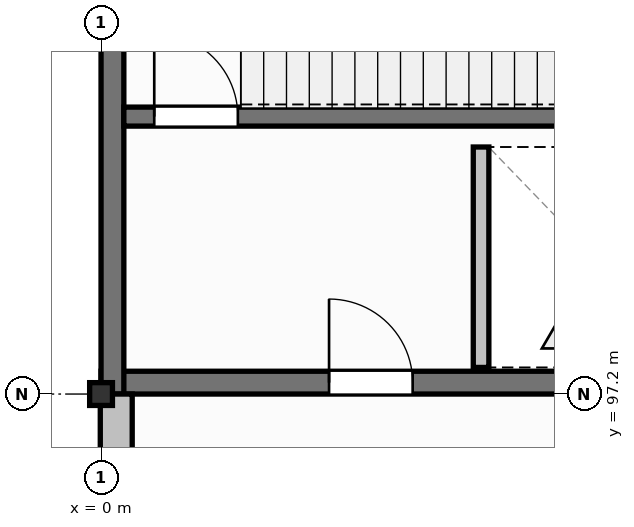
"""IFC4 building model, lengths in metres.
Left out: names, types, materials, properties, quantities, classifications, styles, units other than length and angle.
Written with IfcOpenShell. Run it as: python <this file> out.ifc"""

import sys

from ifc_helpers import new_model, si_unit, direction, frame, frame_2d, origin, origin_2d, place, context, subcontext, project, spatial, rectangle, i_section, extrude, element, fill, save


model = new_model("IFC4")
c1 = context("Model", 3, precision=1e-05, world=origin(), true_north=direction((0.0, 1.0)))
c2 = subcontext(c1, "Body", "Model", "MODEL_VIEW")
j1 = project(units=[si_unit("LENGTHUNIT", "METRE"), si_unit("PLANEANGLEUNIT", "RADIAN")], contexts=[c1])
p1 = place(None, origin())
s1 = spatial("IfcSite", under=j1, at=p1, CompositionType="ELEMENT")
p2 = place(p1, origin())
s2 = spatial("IfcBuilding", under=s1, at=p2, CompositionType="ELEMENT")
p3 = place(p2, frame((0.0, 0.0, 4.5)))
s3 = spatial("IfcBuildingStorey", under=s2, at=p3, CompositionType="ELEMENT", Elevation=4.5)
p4 = place(p3, frame((0.0, 97.35, 0.0), z_axis=(0.0, 0.0, 1.0), x_axis=(1.0, 0.0, 0.0)))
e1 = element("IfcWall", 1, at=p4, inside=s3, PredefinedType="SHEAR", context=c2, shape_type="SweptSolid", body=[
    extrude(rectangle(XDim=8.4, YDim=0.3, at=frame_2d((4.2, 0.0))), origin(), (0.0, 0.0, 1.0), 4.5),
])
p5 = place(p4, frame((3.0, 0.0, 0.0)))
e2 = element("IfcOpeningElement", 2, at=p5, cuts=e1, PredefinedType="OPENING", context=c2, shape_type="SweptSolid", body=[
    extrude(rectangle(XDim=1.1, YDim=2.15, at=frame_2d((0.55, 1.075))), frame((0.0, 0.16, 0.0), z_axis=(0.0, -1.0, 0.0), x_axis=(1.0, 0.0, 0.0)), (0.0, 0.0, 1.0), 0.32),
])
p6 = place(p3, frame((0.15, 97.2, 0.0), z_axis=(0.0, 0.0, 1.0), x_axis=(0.0, 1.0, 0.0)))
e3 = element("IfcWall", 3, at=p6, inside=s3, PredefinedType="SHEAR", context=c2, shape_type="SweptSolid", body=[
    extrude(rectangle(XDim=7.2, YDim=0.3, at=frame_2d((3.6, 0.0))), origin(), (0.0, 0.0, 1.0), 4.5),
])
p7 = place(p3, frame((0.3, 100.85, 0.0), z_axis=(0.0, 0.0, 1.0), x_axis=(1.0, 0.0, 0.0)))
e4 = element("IfcWall", 4, at=p7, inside=s3, PredefinedType="SHEAR", context=c2, shape_type="SweptSolid", body=[
    extrude(rectangle(XDim=7.8, YDim=0.25, at=frame_2d((3.9, 0.0))), origin(), (0.0, 0.0, 1.0), 4.5),
])
p8 = place(p7, frame((0.4, 0.0, 0.0)))
e5 = element("IfcOpeningElement", 5, at=p8, cuts=e4, PredefinedType="OPENING", context=c2, shape_type="SweptSolid", body=[
    extrude(rectangle(XDim=1.1, YDim=2.15, at=frame_2d((0.55, 1.075))), frame((0.0, 0.135, 0.0), z_axis=(0.0, -1.0, 0.0), x_axis=(1.0, 0.0, 0.0)), (0.0, 0.0, 1.0), 0.27),
])
p9 = place(p3, frame((0.0, 97.2, 0.0), z_axis=(0.0, 0.0, 1.0), x_axis=(1.0, 0.0, 0.0)))
e6 = element("IfcColumn", 6, at=p9, inside=s3, PredefinedType="COLUMN", context=c2, shape_type="SweptSolid", body=[
    extrude(i_section(OverallWidth=0.3, OverallDepth=0.3, WebThickness=0.011, FlangeThickness=0.019, FilletRadius=0.027, at=origin_2d()), origin(), (0.0, 0.0, 1.0), 4.5),
])
p10 = place(p3, frame((0.2, 90.0, 0.0), z_axis=(0.0, 0.0, 1.0), x_axis=(0.0, 1.0, 0.0)))
e7 = element("IfcWall", 7, at=p10, inside=s3, PredefinedType="SOLIDWALL", context=c2, shape_type="SweptSolid", body=[
    extrude(rectangle(XDim=7.2, YDim=0.42, at=frame_2d((3.6, 0.0))), origin(), (0.0, 0.0, 1.0), 3.838),
])
p11 = place(p10, frame((1.2, 0.0, 0.85)))
e8 = element("IfcOpeningElement", 8, at=p11, cuts=e7, PredefinedType="OPENING", context=c2, shape_type="SweptSolid", body=[
    extrude(rectangle(XDim=2.4, YDim=2.05, at=frame_2d((1.2, 1.025))), frame((0.0, 0.22, 0.0), z_axis=(0.0, -1.0, 0.0), x_axis=(1.0, 0.0, 0.0)), (0.0, 0.0, 1.0), 0.44),
])
p12 = place(p10, frame((4.175, 0.0, 0.85)))
e9 = element("IfcOpeningElement", 9, at=p12, cuts=e7, PredefinedType="OPENING", context=c2, shape_type="SweptSolid", body=[
    extrude(rectangle(XDim=1.25, YDim=1.5, at=frame_2d((0.625, 0.75))), frame((0.0, 0.22, 0.0), z_axis=(0.0, -1.0, 0.0), x_axis=(1.0, 0.0, 0.0)), (0.0, 0.0, 1.0), 0.44),
])
p13 = place(p3, frame((5.0, 97.55, 0.0), z_axis=(0.0, 0.0, 1.0), x_axis=(0.0, 1.0, 0.0)))
e10 = element("IfcWall", 10, at=p13, inside=s3, PredefinedType="PARTITIONING", context=c2, shape_type="SweptSolid", body=[
    extrude(rectangle(XDim=2.9, YDim=0.205, at=frame_2d((1.45, 0.0))), origin(), (0.0, 0.0, 1.0), 4.23),
])
p14 = place(p8, origin())
e11 = element("IfcDoor", 11, at=p14, inside=s3, OperationType="SINGLE_SWING_LEFT", PredefinedType="DOOR", context=c2, shape_type="SweptSolid", body=[
    extrude(rectangle(XDim=1.1, YDim=2.15, at=frame_2d((0.55, 1.075))), frame((0.0, 0.025, 0.0), z_axis=(0.0, -1.0, 0.0), x_axis=(1.0, 0.0, 0.0)), (0.0, 0.0, 1.0), 0.05),
])
fill(e5, e11)
p15 = place(p5, origin())
e12 = element("IfcDoor", 12, at=p15, inside=s3, OperationType="SINGLE_SWING_LEFT", PredefinedType="DOOR", context=c2, shape_type="SweptSolid", body=[
    extrude(rectangle(XDim=1.1, YDim=2.15, at=frame_2d((0.55, 1.075))), frame((0.0, 0.025, 0.0), z_axis=(0.0, -1.0, 0.0), x_axis=(1.0, 0.0, 0.0)), (0.0, 0.0, 1.0), 0.05),
])
fill(e2, e12)
save(model, sys.argv[1])
